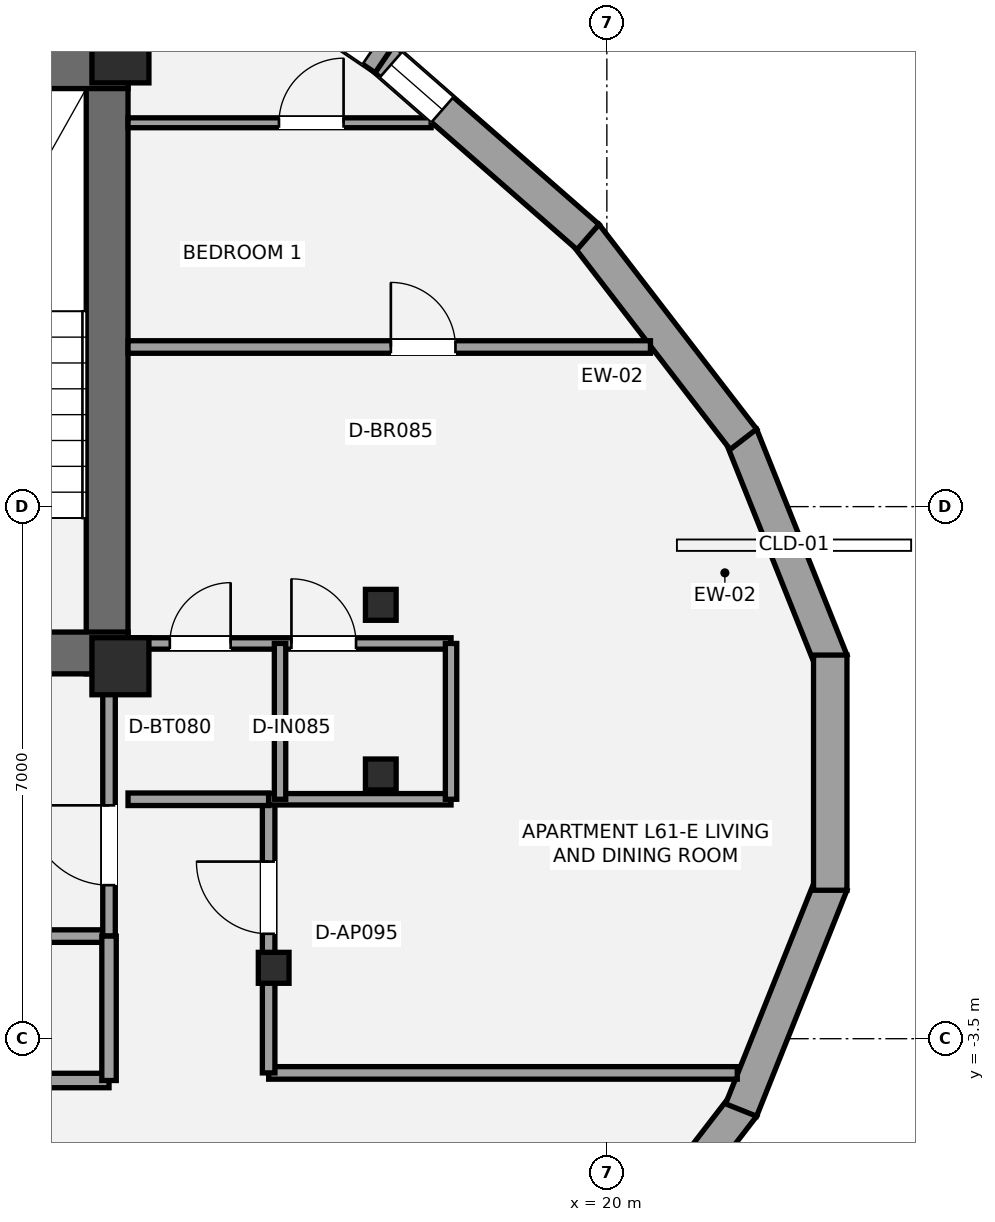
"""IFC4 building model, lengths in metres.
Left out: names, types, materials, properties, quantities, classifications, styles, units other than length and angle.
Written with IfcOpenShell. Run it as: python <this file> out.ifc"""

import sys

from ifc_helpers import new_model, si_unit, direction, frame, frame_2d, origin, origin_2d, place, context, subcontext, project, spatial, rectangle, i_section, extrude, element, fill, save


model = new_model("IFC4")
c1 = context("Model", 3, precision=1e-05, world=origin(), true_north=direction((0.0, 1.0)))
c2 = subcontext(c1, "Body", "Model", "MODEL_VIEW")
j1 = project(units=[si_unit("LENGTHUNIT", "METRE"), si_unit("PLANEANGLEUNIT", "RADIAN")], contexts=[c1])
p1 = place(None, origin())
s1 = spatial("IfcSite", under=j1, at=p1, CompositionType="ELEMENT")
p2 = place(p1, origin())
s2 = spatial("IfcBuilding", under=s1, at=p2, CompositionType="ELEMENT")
p3 = place(p2, frame((0.0, 0.0, 219.45)))
s3 = spatial("IfcBuildingStorey", under=s2, at=p3, CompositionType="ELEMENT", Elevation=219.45)
p4 = place(p3, frame((13.425, 1.3, 0.0), z_axis=(0.0, 0.0, 1.0), x_axis=(0.0, 1.0, 0.0)))
e1 = element("IfcWall", 1, at=p4, inside=s3, PredefinedType="SHEAR", context=c2, shape_type="SweptSolid", body=[
    extrude(rectangle(XDim=8.25, YDim=0.55, at=frame_2d((4.125, 0.0))), origin(), (0.0, 0.0, 1.0), 3.15),
])
p5 = place(p3, frame((4.525, 9.275, 0.0), z_axis=(0.0, 0.0, 1.0), x_axis=(1.0, 0.0, 0.0)))
e2 = element("IfcWall", 2, at=p5, inside=s3, PredefinedType="SHEAR", context=c2, shape_type="SweptSolid", body=[
    extrude(rectangle(XDim=9.175, YDim=0.55, at=frame_2d((4.587, 0.0))), origin(), (0.0, 0.0, 1.0), 3.15),
])
p6 = place(p3, frame((13.7, 1.575, 0.0), z_axis=(0.0, 0.0, 1.0), x_axis=(-1.0, 0.0, 0.0)))
e3 = element("IfcWall", 3, at=p6, inside=s3, PredefinedType="SHEAR", context=c2, shape_type="SweptSolid", body=[
    extrude(rectangle(XDim=8.775, YDim=0.55, at=frame_2d((4.387, 0.0))), origin(), (0.0, 0.0, 1.0), 3.15),
])
p7 = place(p6, frame((2.35, 0.0, 0.0)))
e4 = element("IfcOpeningElement", 4, at=p7, cuts=e3, PredefinedType="OPENING", context=c2, shape_type="SweptSolid", body=[
    extrude(rectangle(XDim=1.05, YDim=2.15, at=frame_2d((0.525, 1.075))), frame((0.0, 0.285, 0.0), z_axis=(0.0, -1.0, 0.0), x_axis=(1.0, 0.0, 0.0)), (0.0, 0.0, 1.0), 0.57),
])
p8 = place(p6, frame((4.35, 0.0, 0.0)))
e5 = element("IfcOpeningElement", 5, at=p8, cuts=e3, PredefinedType="OPENING", context=c2, shape_type="SweptSolid", body=[
    extrude(rectangle(XDim=1.1, YDim=2.2, at=frame_2d((0.55, 1.1))), frame((0.0, 0.285, 0.0), z_axis=(0.0, -1.0, 0.0), x_axis=(1.0, 0.0, 0.0)), (0.0, 0.0, 1.0), 0.57),
])
for number, where, z_axis, x_axis in (
    (6, (13.6, 1.4, 0.0), (0.0, 0.0, 1.0), (1.0, 0.0, 0.0)),
    (7, (13.6, 9.45, 0.0), (0.0, 0.0, 1.0), (1.0, 0.0, 0.0)),
):
    element("IfcColumn", number, at=place(p3, frame(where, z_axis=z_axis, x_axis=x_axis)), inside=s3, PredefinedType="PILASTER", context=c2, shape_type="SweptSolid", body=[
        extrude(rectangle(XDim=0.75, YDim=0.75, at=origin_2d()), origin(), (0.0, 0.0, 1.0), 3.15),
    ])
for number, where, z_axis, x_axis in (
    (8, (17.026, 2.208, 0.0), (0.0, 0.0, 1.0), (1.0, 0.0, 0.0)),
    (9, (15.616, -2.567, 0.0), (0.0, 0.0, 1.0), (1.0, 0.0, 0.0)),
    (10, (17.026, -0.024, 0.0), (0.0, 0.0, 1.0), (1.0, 0.0, 0.0)),
):
    element("IfcColumn", number, at=place(p3, frame(where, z_axis=z_axis, x_axis=x_axis)), inside=s3, PredefinedType="COLUMN", context=c2, shape_type="SweptSolid", body=[
        extrude(i_section(OverallWidth=0.404, OverallDepth=0.407, WebThickness=0.027, FlangeThickness=0.044, at=origin_2d()), origin(), (0.0, 0.0, 1.0), 3.15),
    ])
p9 = place(p3, frame((21.766, 4.438, 0.0), z_axis=(0.0, 0.0, 1.0), x_axis=(0.371272350835, -0.928524012347, 0.0)))
e11 = element("IfcWall", 11, at=p9, inside=s3, PredefinedType="STANDARD", context=c2, shape_type="SweptSolid", body=[
    extrude(rectangle(XDim=3.202, YDim=0.44, at=frame_2d((1.601, 0.0))), origin(), (0.0, 0.0, 1.0), 2.336),
])
p10 = place(p3, frame((19.723, 7.079, 0.0), z_axis=(0.0, 0.0, 1.0), x_axis=(0.61008909013, -0.792332822811, 0.0)))
e12 = element("IfcWall", 12, at=p10, inside=s3, PredefinedType="STANDARD", context=c2, shape_type="SweptSolid", body=[
    extrude(rectangle(XDim=3.399, YDim=0.44, at=frame_2d((1.699, 0.0))), origin(), (0.0, 0.0, 1.0), 2.336),
])
p11 = place(p3, frame((17.054, 9.407, 0.0), z_axis=(0.0, 0.0, 1.0), x_axis=(0.752758077019, -0.658297256172, 0.0)))
e13 = element("IfcWall", 13, at=p11, inside=s3, PredefinedType="STANDARD", context=c2, shape_type="SweptSolid", body=[
    extrude(rectangle(XDim=3.585, YDim=0.44, at=frame_2d((1.792, 0.0))), origin(), (0.0, 0.0, 1.0), 2.336),
])
p12 = place(p11, frame((0.14, 0.0, 0.42)))
e14 = element("IfcOpeningElement", 14, at=p12, cuts=e13, PredefinedType="OPENING", context=c2, shape_type="SweptSolid", body=[
    extrude(rectangle(XDim=0.9, YDim=1.35, at=frame_2d((0.45, 0.675))), frame((0.0, 0.23, 0.0), z_axis=(0.0, -1.0, 0.0), x_axis=(1.0, 0.0, 0.0)), (0.0, 0.0, 1.0), 0.46),
])
p13 = place(p3, frame((13.991, 11.482, 0.0), z_axis=(0.0, 0.0, 1.0), x_axis=(0.827609463482, -0.56130435234, 0.0)))
e15 = element("IfcWall", 15, at=p13, inside=s3, PredefinedType="STANDARD", context=c2, shape_type="SweptSolid", body=[
    extrude(rectangle(XDim=3.727, YDim=0.44, at=frame_2d((1.863, 0.0))), origin(), (0.0, 0.0, 1.0), 2.336),
])
p14 = place(p13, frame((2.626, 0.0, 0.42)))
e16 = element("IfcOpeningElement", 16, at=p14, cuts=e15, PredefinedType="OPENING", context=c2, shape_type="SweptSolid", body=[
    extrude(rectangle(XDim=0.9, YDim=1.35, at=frame_2d((0.45, 0.675))), frame((0.0, 0.23, 0.0), z_axis=(0.0, -1.0, 0.0), x_axis=(1.0, 0.0, 0.0)), (0.0, 0.0, 1.0), 0.46),
])
p15 = place(p3, frame((21.796, -4.386, 0.0), z_axis=(0.0, 0.0, 1.0), x_axis=(-0.61008909013, -0.792332822811, 0.0)))
e17 = element("IfcWall", 17, at=p15, inside=s3, PredefinedType="STANDARD", context=c2, shape_type="SweptSolid", body=[
    extrude(rectangle(XDim=3.399, YDim=0.44, at=frame_2d((1.699, 0.0))), origin(), (0.0, 0.0, 1.0), 2.336),
])
p16 = place(p3, frame((22.955, -1.465, 0.0), z_axis=(0.0, 0.0, 1.0), x_axis=(-0.371272350835, -0.928524012347, 0.0)))
e18 = element("IfcWall", 18, at=p16, inside=s3, PredefinedType="STANDARD", context=c2, shape_type="SweptSolid", body=[
    extrude(rectangle(XDim=3.202, YDim=0.44, at=frame_2d((1.601, 0.0))), origin(), (0.0, 0.0, 1.0), 2.336),
])
p17 = place(p3, frame((22.939, 1.547, 0.0), z_axis=(0.0, 0.0, 1.0), x_axis=(0.0, -1.0, 0.0)))
e19 = element("IfcWall", 19, at=p17, inside=s3, PredefinedType="STANDARD", context=c2, shape_type="SweptSolid", body=[
    extrude(rectangle(XDim=3.094, YDim=0.44, at=frame_2d((1.547, 0.0))), origin(), (0.0, 0.0, 1.0), 2.336),
])
p18 = place(p3, frame((7.2, -2.15, 0.0), z_axis=(0.0, 0.0, 1.0), x_axis=(1.0, 0.0, 0.0)))
e20 = element("IfcWall", 20, at=p18, inside=s3, PredefinedType="PARTITIONING", context=c2, shape_type="SweptSolid", body=[
    extrude(rectangle(XDim=6.25, YDim=0.165, at=frame_2d((3.125, 0.0))), origin(), (0.0, 0.0, 1.0), 2.97),
])
p19 = place(p3, frame((13.45, -2.15, 0.0), z_axis=(0.0, 0.0, 1.0), x_axis=(0.0, 1.0, 0.0)))
e21 = element("IfcWall", 21, at=p19, inside=s3, PredefinedType="PARTITIONING", context=c2, shape_type="SweptSolid", body=[
    extrude(rectangle(XDim=3.5, YDim=0.165, at=frame_2d((1.75, 0.0))), origin(), (0.0, 0.0, 1.0), 2.423),
])
p20 = place(p19, frame((0.67, 0.0, 0.0)))
e22 = element("IfcOpeningElement", 22, at=p20, cuts=e21, PredefinedType="OPENING", context=c2, shape_type="SweptSolid", body=[
    extrude(rectangle(XDim=1.05, YDim=2.15, at=frame_2d((0.525, 1.075))), frame((0.0, 0.093, 0.0), z_axis=(0.0, -1.0, 0.0), x_axis=(1.0, 0.0, 0.0)), (0.0, 0.0, 1.0), 0.185),
])
p21 = place(p3, frame((2.1, -4.05, 0.0), z_axis=(0.0, 0.0, 1.0), x_axis=(1.0, 0.0, 0.0)))
e23 = element("IfcWall", 23, at=p21, inside=s3, PredefinedType="PLUMBINGWALL", context=c2, shape_type="SweptSolid", body=[
    extrude(rectangle(XDim=11.35, YDim=0.19, at=frame_2d((5.675, 0.0))), origin(), (0.0, 0.0, 1.0), 2.357),
])
p22 = place(p21, frame((5.2, 0.0, 0.0)))
e24 = element("IfcOpeningElement", 24, at=p22, cuts=e23, PredefinedType="OPENING", context=c2, shape_type="SweptSolid", body=[
    extrude(rectangle(XDim=0.9, YDim=2.1, at=frame_2d((0.45, 1.05))), frame((0.0, 0.105, 0.0), z_axis=(0.0, -1.0, 0.0), x_axis=(1.0, 0.0, 0.0)), (0.0, 0.0, 1.0), 0.21),
])
p23 = place(p3, frame((13.45, -4.05, 0.0), z_axis=(0.0, 0.0, 1.0), x_axis=(0.0, 1.0, 0.0)))
e25 = element("IfcWall", 25, at=p23, inside=s3, PredefinedType="PLUMBINGWALL", context=c2, shape_type="SweptSolid", body=[
    extrude(rectangle(XDim=1.9, YDim=0.19, at=frame_2d((0.95, 0.0))), origin(), (0.0, 0.0, 1.0), 2.423),
])
p24 = place(p3, frame((15.55, -3.95, 0.0), z_axis=(0.0, 0.0, 1.0), x_axis=(1.0, 0.0, 0.0)))
e26 = element("IfcWall", 26, at=p24, inside=s3, PredefinedType="PARTITIONING", context=c2, shape_type="SweptSolid", body=[
    extrude(rectangle(XDim=6.166, YDim=0.165, at=frame_2d((3.083, 0.0))), origin(), (0.0, 0.0, 1.0), 2.423),
])
p25 = place(p3, frame((15.55, -3.95, 0.0), z_axis=(0.0, 0.0, 1.0), x_axis=(0.0, 1.0, 0.0)))
e27 = element("IfcWall", 27, at=p25, inside=s3, PredefinedType="PARTITIONING", context=c2, shape_type="SweptSolid", body=[
    extrude(rectangle(XDim=3.6, YDim=0.165, at=frame_2d((1.8, 0.0))), origin(), (0.0, 0.0, 1.0), 2.357),
])
p26 = place(p25, frame((1.83, 0.0, 0.0)))
e28 = element("IfcOpeningElement", 28, at=p26, cuts=e27, PredefinedType="OPENING", context=c2, shape_type="SweptSolid", body=[
    extrude(rectangle(XDim=0.95, YDim=2.15, at=frame_2d((0.475, 1.075))), frame((0.0, 0.093, 0.0), z_axis=(0.0, -1.0, 0.0), x_axis=(1.0, 0.0, 0.0)), (0.0, 0.0, 1.0), 0.185),
])
p27 = place(p3, frame((13.7, -0.35, 0.0), z_axis=(0.0, 0.0, 1.0), x_axis=(1.0, 0.0, 0.0)))
e29 = element("IfcWall", 29, at=p27, inside=s3, PredefinedType="PARTITIONING", context=c2, shape_type="SweptSolid", body=[
    extrude(rectangle(XDim=1.85, YDim=0.165, at=frame_2d((0.925, 0.0))), origin(), (0.0, 0.0, 1.0), 2.423),
])
p28 = place(p3, frame((13.7, 5.6, 0.0), z_axis=(0.0, 0.0, 1.0), x_axis=(1.0, 0.0, 0.0)))
e30 = element("IfcWall", 30, at=p28, inside=s3, PredefinedType="PARTITIONING", context=c2, shape_type="SweptSolid", body=[
    extrude(rectangle(XDim=6.874, YDim=0.165, at=frame_2d((3.437, 0.0))), origin(), (0.0, 0.0, 1.0), 2.423),
])
p29 = place(p28, frame((3.458, 0.0, 0.0)))
e31 = element("IfcOpeningElement", 31, at=p29, cuts=e30, PredefinedType="OPENING", context=c2, shape_type="SweptSolid", body=[
    extrude(rectangle(XDim=0.85, YDim=2.1, at=frame_2d((0.425, 1.05))), frame((0.0, 0.093, 0.0), z_axis=(0.0, -1.0, 0.0), x_axis=(1.0, 0.0, 0.0)), (0.0, 0.0, 1.0), 0.185),
])
p30 = place(p3, frame((13.7, 1.7, 0.0), z_axis=(0.0, 0.0, 1.0), x_axis=(1.0, 0.0, 0.0)))
e32 = element("IfcWall", 32, at=p30, inside=s3, PredefinedType="PLUMBINGWALL", context=c2, shape_type="SweptSolid", body=[
    extrude(rectangle(XDim=4.25, YDim=0.15, at=frame_2d((2.125, 0.0))), origin(), (0.0, 0.0, 1.0), 2.423),
])
p31 = place(p30, frame((0.55, 0.0, 0.0)))
e33 = element("IfcOpeningElement", 33, at=p31, cuts=e32, PredefinedType="OPENING", context=c2, shape_type="SweptSolid", body=[
    extrude(rectangle(XDim=0.8, YDim=2.1, at=frame_2d((0.4, 1.05))), frame((0.0, 0.085, 0.0), z_axis=(0.0, -1.0, 0.0), x_axis=(1.0, 0.0, 0.0)), (0.0, 0.0, 1.0), 0.17),
])
p32 = place(p30, frame((2.15, 0.0, 0.0)))
e34 = element("IfcOpeningElement", 34, at=p32, cuts=e32, PredefinedType="OPENING", context=c2, shape_type="SweptSolid", body=[
    extrude(rectangle(XDim=0.85, YDim=2.1, at=frame_2d((0.425, 1.05))), frame((0.0, 0.085, 0.0), z_axis=(0.0, -1.0, 0.0), x_axis=(1.0, 0.0, 0.0)), (0.0, 0.0, 1.0), 0.17),
])
p33 = place(p3, frame((15.55, -0.35, 0.0), z_axis=(0.0, 0.0, 1.0), x_axis=(1.0, 0.0, 0.0)))
e35 = element("IfcWall", 35, at=p33, inside=s3, PredefinedType="PLUMBINGWALL", context=c2, shape_type="SweptSolid", body=[
    extrude(rectangle(XDim=2.4, YDim=0.15, at=frame_2d((1.2, 0.0))), origin(), (0.0, 0.0, 1.0), 2.423),
])
p34 = place(p3, frame((15.7, -0.35, 0.0), z_axis=(0.0, 0.0, 1.0), x_axis=(0.0, 1.0, 0.0)))
e36 = element("IfcWall", 36, at=p34, inside=s3, PredefinedType="PLUMBINGWALL", context=c2, shape_type="SweptSolid", body=[
    extrude(rectangle(XDim=2.05, YDim=0.15, at=frame_2d((1.025, 0.0))), origin(), (0.0, 0.0, 1.0), 2.97),
])
p35 = place(p3, frame((17.95, -0.35, 0.0), z_axis=(0.0, 0.0, 1.0), x_axis=(0.0, 1.0, 0.0)))
e37 = element("IfcWall", 37, at=p35, inside=s3, PredefinedType="PLUMBINGWALL", context=c2, shape_type="SweptSolid", body=[
    extrude(rectangle(XDim=2.05, YDim=0.15, at=frame_2d((1.025, 0.0))), origin(), (0.0, 0.0, 1.0), 2.423),
])
p36 = place(p3, frame((13.7, 8.55, 0.0), z_axis=(0.0, 0.0, 1.0), x_axis=(1.0, 0.0, 0.0)))
e38 = element("IfcWall", 38, at=p36, inside=s3, PredefinedType="PARTITIONING", context=c2, shape_type="SweptSolid", body=[
    extrude(rectangle(XDim=3.988, YDim=0.13, at=frame_2d((1.994, 0.0))), origin(), (0.0, 0.0, 1.0), 2.423),
])
p37 = place(p36, frame((1.986, 0.0, 0.0)))
e39 = element("IfcOpeningElement", 39, at=p37, cuts=e38, PredefinedType="OPENING", context=c2, shape_type="SweptSolid", body=[
    extrude(rectangle(XDim=0.85, YDim=2.1, at=frame_2d((0.425, 1.05))), frame((0.0, 0.075, 0.0), z_axis=(0.0, -1.0, 0.0), x_axis=(1.0, 0.0, 0.0)), (0.0, 0.0, 1.0), 0.15),
])
p38 = place(p14, origin())
e40 = element("IfcWindow", 40, at=p38, inside=s3, PartitioningType="SINGLE_PANEL", PredefinedType="WINDOW", context=c2, shape_type="SweptSolid", body=[
    extrude(rectangle(XDim=0.9, YDim=1.35, at=frame_2d((0.45, 0.675))), frame((0.0, -0.01, 0.0), z_axis=(0.0, -1.0, 0.0), x_axis=(1.0, 0.0, 0.0)), (0.0, 0.0, 1.0), 0.06),
])
fill(e16, e40)
p39 = place(p12, origin())
e41 = element("IfcWindow", 41, at=p39, inside=s3, PartitioningType="SINGLE_PANEL", PredefinedType="WINDOW", context=c2, shape_type="SweptSolid", body=[
    extrude(rectangle(XDim=0.9, YDim=1.35, at=frame_2d((0.45, 0.675))), frame((0.0, -0.01, 0.0), z_axis=(0.0, -1.0, 0.0), x_axis=(1.0, 0.0, 0.0)), (0.0, 0.0, 1.0), 0.06),
])
fill(e14, e41)
p40 = place(p20, origin())
e42 = element("IfcDoor", 42, at=p40, inside=s3, OperationType="SINGLE_SWING_RIGHT", PredefinedType="DOOR", context=c2, shape_type="SweptSolid", body=[
    extrude(rectangle(XDim=1.05, YDim=2.15, at=frame_2d((0.525, 1.075))), frame((0.0, 0.025, 0.0), z_axis=(0.0, -1.0, 0.0), x_axis=(1.0, 0.0, 0.0)), (0.0, 0.0, 1.0), 0.05),
])
fill(e22, e42)
p41 = place(p26, origin())
e43 = element("IfcDoor", 43, at=p41, inside=s3, OperationType="SINGLE_SWING_RIGHT", PredefinedType="DOOR", context=c2, shape_type="SweptSolid", body=[
    extrude(rectangle(XDim=0.95, YDim=2.15, at=frame_2d((0.475, 1.075))), frame((0.0, 0.025, 0.0), z_axis=(0.0, -1.0, 0.0), x_axis=(1.0, 0.0, 0.0)), (0.0, 0.0, 1.0), 0.05),
])
fill(e28, e43)
p42 = place(p31, origin())
e44 = element("IfcDoor", 44, at=p42, inside=s3, OperationType="SINGLE_SWING_RIGHT", PredefinedType="DOOR", context=c2, shape_type="SweptSolid", body=[
    extrude(rectangle(XDim=0.8, YDim=2.1, at=frame_2d((0.4, 1.05))), frame((0.0, 0.025, 0.0), z_axis=(0.0, -1.0, 0.0), x_axis=(1.0, 0.0, 0.0)), (0.0, 0.0, 1.0), 0.05),
])
fill(e33, e44)
p43 = place(p32, origin())
e45 = element("IfcDoor", 45, at=p43, inside=s3, OperationType="SINGLE_SWING_LEFT", PredefinedType="DOOR", context=c2, shape_type="SweptSolid", body=[
    extrude(rectangle(XDim=0.85, YDim=2.1, at=frame_2d((0.425, 1.05))), frame((0.0, 0.025, 0.0), z_axis=(0.0, -1.0, 0.0), x_axis=(1.0, 0.0, 0.0)), (0.0, 0.0, 1.0), 0.05),
])
fill(e34, e45)
p44 = place(p29, origin())
e46 = element("IfcDoor", 46, at=p44, inside=s3, OperationType="SINGLE_SWING_LEFT", PredefinedType="DOOR", context=c2, shape_type="SweptSolid", body=[
    extrude(rectangle(XDim=0.85, YDim=2.1, at=frame_2d((0.425, 1.05))), frame((0.0, 0.025, 0.0), z_axis=(0.0, -1.0, 0.0), x_axis=(1.0, 0.0, 0.0)), (0.0, 0.0, 1.0), 0.05),
])
fill(e31, e46)
p45 = place(p37, origin())
e47 = element("IfcDoor", 47, at=p45, inside=s3, OperationType="SINGLE_SWING_RIGHT", PredefinedType="DOOR", context=c2, shape_type="SweptSolid", body=[
    extrude(rectangle(XDim=0.85, YDim=2.1, at=frame_2d((0.425, 1.05))), frame((0.0, 0.025, 0.0), z_axis=(0.0, -1.0, 0.0), x_axis=(1.0, 0.0, 0.0)), (0.0, 0.0, 1.0), 0.05),
])
fill(e39, e47)
save(model, sys.argv[1])
